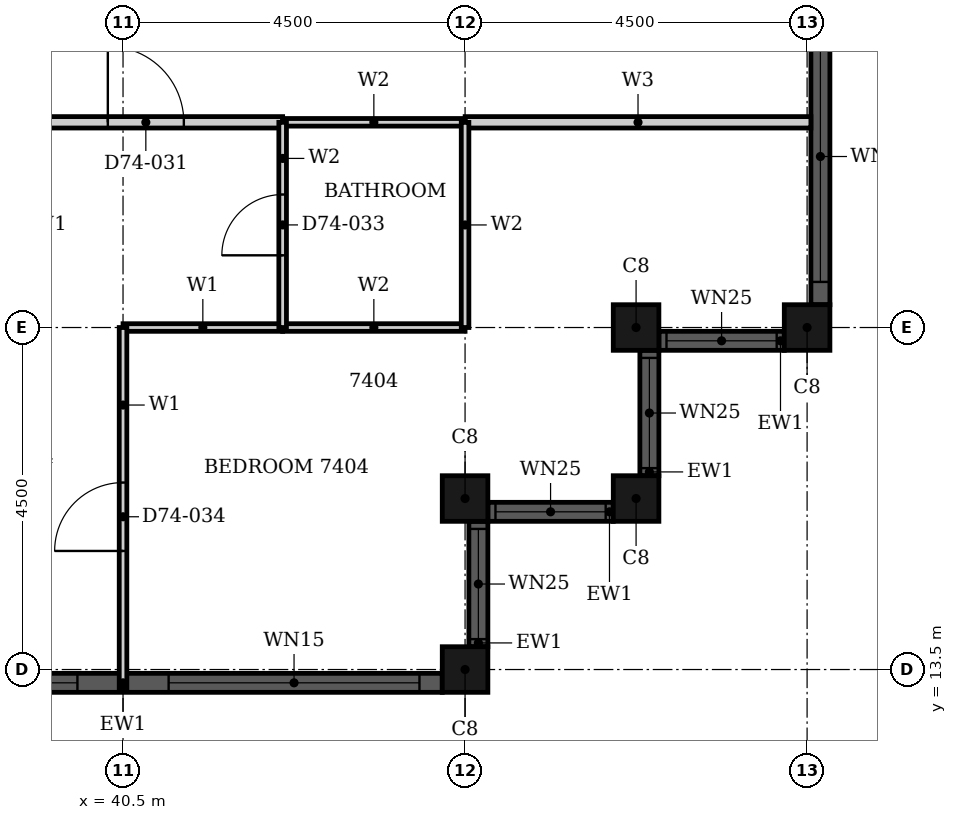
"""IFC4 building model, lengths in metres.
Left out: names, types, materials, properties, quantities, classifications, styles, units other than length and angle.
Written with IfcOpenShell. Run it as: python <this file> out.ifc"""

import sys

from ifc_helpers import new_model, si_unit, direction, frame, frame_2d, origin, origin_2d, place, context, subcontext, project, spatial, rectangle, hollow_rectangle, extrude, element, fill, save


model = new_model("IFC4")
c1 = context("Model", 3, precision=1e-05, world=origin(), true_north=direction((0.0, 1.0)))
c2 = subcontext(c1, "Body", "Model", "MODEL_VIEW")
j1 = project(units=[si_unit("LENGTHUNIT", "METRE"), si_unit("PLANEANGLEUNIT", "RADIAN")], contexts=[c1])
p1 = place(None, origin())
s1 = spatial("IfcSite", under=j1, at=p1, CompositionType="ELEMENT")
p2 = place(p1, origin())
s2 = spatial("IfcBuilding", under=s1, at=p2, CompositionType="ELEMENT")
p3 = place(p2, frame((0.0, 0.0, 290.8)))
s3 = spatial("IfcBuildingStorey", under=s2, at=p3, CompositionType="ELEMENT", Elevation=290.8)
for number, where, z_axis, x_axis in (
    (1, (45.0, 13.5, 0.0), (0.0, 0.0, 1.0), (1.0, 0.0, 0.0)),
    (2, (45.0, 15.75, 0.0), (0.0, 0.0, 1.0), (1.0, 0.0, 0.0)),
    (3, (47.25, 15.75, 0.0), (0.0, 0.0, 1.0), (1.0, 0.0, 0.0)),
    (4, (47.25, 18.0, 0.0), (0.0, 0.0, 1.0), (1.0, 0.0, 0.0)),
    (5, (49.5, 18.0, 0.0), (0.0, 0.0, 1.0), (1.0, 0.0, 0.0)),
):
    element("IfcColumn", number, at=place(p3, frame(where, z_axis=z_axis, x_axis=x_axis)), inside=s3, PredefinedType="COLUMN", context=c2, shape_type="SweptSolid", body=[
        extrude(hollow_rectangle(XDim=0.6, YDim=0.6, WallThickness=0.02, at=origin_2d()), origin(), (0.0, 0.0, 1.0), 3.7),
    ])
p4 = place(p3, frame((45.175, 13.8, 0.0), z_axis=(0.0, 0.0, 1.0), x_axis=(0.0, 1.0, 0.0)))
e6 = element("IfcWall", 6, at=p4, inside=s3, PredefinedType="SOLIDWALL", context=c2, shape_type="SweptSolid", body=[
    extrude(rectangle(XDim=1.65, YDim=0.25, at=frame_2d((0.825, 0.0))), origin(), (0.0, 0.0, 1.0), 3.7),
])
p5 = place(p4, frame((0.1, 0.0, 0.9)))
e7 = element("IfcOpeningElement", 7, at=p5, cuts=e6, PredefinedType="OPENING", context=c2, shape_type="SweptSolid", body=[
    extrude(rectangle(XDim=1.45, YDim=1.85, at=frame_2d((0.725, 0.925))), frame((0.0, 0.135, 0.0), z_axis=(0.0, -1.0, 0.0), x_axis=(1.0, 0.0, 0.0)), (0.0, 0.0, 1.0), 0.27),
])
p6 = place(p3, frame((45.3, 15.575, 0.0), z_axis=(0.0, 0.0, 1.0), x_axis=(1.0, 0.0, 0.0)))
e8 = element("IfcWall", 8, at=p6, inside=s3, PredefinedType="SOLIDWALL", context=c2, shape_type="SweptSolid", body=[
    extrude(rectangle(XDim=1.65, YDim=0.25, at=frame_2d((0.825, 0.0))), origin(), (0.0, 0.0, 1.0), 3.7),
])
p7 = place(p6, frame((0.1, 0.0, 0.9)))
e9 = element("IfcOpeningElement", 9, at=p7, cuts=e8, PredefinedType="OPENING", context=c2, shape_type="SweptSolid", body=[
    extrude(rectangle(XDim=1.45, YDim=1.85, at=frame_2d((0.725, 0.925))), frame((0.0, 0.135, 0.0), z_axis=(0.0, -1.0, 0.0), x_axis=(1.0, 0.0, 0.0)), (0.0, 0.0, 1.0), 0.27),
])
p8 = place(p3, frame((47.425, 16.05, 0.0), z_axis=(0.0, 0.0, 1.0), x_axis=(0.0, 1.0, 0.0)))
e10 = element("IfcWall", 10, at=p8, inside=s3, PredefinedType="SOLIDWALL", context=c2, shape_type="SweptSolid", body=[
    extrude(rectangle(XDim=1.65, YDim=0.25, at=frame_2d((0.825, 0.0))), origin(), (0.0, 0.0, 1.0), 3.7),
])
p9 = place(p8, frame((0.1, 0.0, 0.9)))
e11 = element("IfcOpeningElement", 11, at=p9, cuts=e10, PredefinedType="OPENING", context=c2, shape_type="SweptSolid", body=[
    extrude(rectangle(XDim=1.45, YDim=1.85, at=frame_2d((0.725, 0.925))), frame((0.0, 0.135, 0.0), z_axis=(0.0, -1.0, 0.0), x_axis=(1.0, 0.0, 0.0)), (0.0, 0.0, 1.0), 0.27),
])
p10 = place(p3, frame((47.55, 17.825, 0.0), z_axis=(0.0, 0.0, 1.0), x_axis=(1.0, 0.0, 0.0)))
e12 = element("IfcWall", 12, at=p10, inside=s3, PredefinedType="SOLIDWALL", context=c2, shape_type="SweptSolid", body=[
    extrude(rectangle(XDim=1.65, YDim=0.25, at=frame_2d((0.825, 0.0))), origin(), (0.0, 0.0, 1.0), 3.7),
])
p11 = place(p10, frame((0.1, 0.0, 0.9)))
e13 = element("IfcOpeningElement", 13, at=p11, cuts=e12, PredefinedType="OPENING", context=c2, shape_type="SweptSolid", body=[
    extrude(rectangle(XDim=1.45, YDim=1.85, at=frame_2d((0.725, 0.925))), frame((0.0, 0.135, 0.0), z_axis=(0.0, -1.0, 0.0), x_axis=(1.0, 0.0, 0.0)), (0.0, 0.0, 1.0), 0.27),
])
p12 = place(p3, frame((49.675, 18.3, 0.0), z_axis=(0.0, 0.0, 1.0), x_axis=(0.0, 1.0, 0.0)))
e14 = element("IfcWall", 14, at=p12, inside=s3, PredefinedType="SOLIDWALL", context=c2, shape_type="SweptSolid", body=[
    extrude(rectangle(XDim=8.4, YDim=0.25, at=frame_2d((4.2, 0.0))), origin(), (0.0, 0.0, 1.0), 3.7),
])
p13 = place(p12, frame((0.3, 0.0, 0.45)))
e15 = element("IfcOpeningElement", 15, at=p13, cuts=e14, PredefinedType="OPENING", context=c2, shape_type="SweptSolid", body=[
    extrude(rectangle(XDim=3.3, YDim=2.3, at=frame_2d((1.65, 1.15))), frame((0.0, 0.135, 0.0), z_axis=(0.0, -1.0, 0.0), x_axis=(1.0, 0.0, 0.0)), (0.0, 0.0, 1.0), 0.27),
])
p14 = place(p12, frame((4.8, 0.0, 0.45)))
e16 = element("IfcOpeningElement", 16, at=p14, cuts=e14, PredefinedType="OPENING", context=c2, shape_type="SweptSolid", body=[
    extrude(rectangle(XDim=3.3, YDim=2.3, at=frame_2d((1.65, 1.15))), frame((0.0, 0.135, 0.0), z_axis=(0.0, -1.0, 0.0), x_axis=(1.0, 0.0, 0.0)), (0.0, 0.0, 1.0), 0.27),
])
p15 = place(p3, frame((36.3, 13.325, 0.0), z_axis=(0.0, 0.0, 1.0), x_axis=(1.0, 0.0, 0.0)))
e17 = element("IfcWall", 17, at=p15, inside=s3, PredefinedType="SOLIDWALL", context=c2, shape_type="SweptSolid", body=[
    extrude(rectangle(XDim=8.4, YDim=0.25, at=frame_2d((4.2, 0.0))), origin(), (0.0, 0.0, 1.0), 3.7),
])
p16 = place(p15, frame((0.3, 0.0, 0.45)))
e18 = element("IfcOpeningElement", 18, at=p16, cuts=e17, PredefinedType="OPENING", context=c2, shape_type="SweptSolid", body=[
    extrude(rectangle(XDim=3.3, YDim=2.3, at=frame_2d((1.65, 1.15))), frame((0.0, 0.135, 0.0), z_axis=(0.0, -1.0, 0.0), x_axis=(1.0, 0.0, 0.0)), (0.0, 0.0, 1.0), 0.27),
])
p17 = place(p15, frame((4.8, 0.0, 0.45)))
e19 = element("IfcOpeningElement", 19, at=p17, cuts=e17, PredefinedType="OPENING", context=c2, shape_type="SweptSolid", body=[
    extrude(rectangle(XDim=3.3, YDim=2.3, at=frame_2d((1.65, 1.15))), frame((0.0, 0.135, 0.0), z_axis=(0.0, -1.0, 0.0), x_axis=(1.0, 0.0, 0.0)), (0.0, 0.0, 1.0), 0.27),
])
p18 = place(p3, frame((45.001, 20.7, 0.0), z_axis=(0.0, 0.0, 1.0), x_axis=(1.0, 0.0, 0.0)))
e20 = element("IfcWall", 20, at=p18, inside=s3, PredefinedType="PARTITIONING", context=c2, shape_type="SweptSolid", body=[
    extrude(rectangle(XDim=4.549, YDim=0.15, at=frame_2d((2.274, 0.0))), origin(), (0.0, 0.0, 1.0), 3.4),
])
p19 = place(p3, frame((36.0, 20.7, 0.0), z_axis=(0.0, 0.0, 1.0), x_axis=(1.0, 0.0, 0.0)))
e21 = element("IfcWall", 21, at=p19, inside=s3, PredefinedType="PARTITIONING", context=c2, shape_type="SweptSolid", body=[
    extrude(rectangle(XDim=6.6, YDim=0.15, at=frame_2d((3.3, 0.0))), origin(), (0.0, 0.0, 1.0), 3.4),
])
p20 = place(p19, frame((4.3, 0.0, 0.0)))
e22 = element("IfcOpeningElement", 22, at=p20, cuts=e21, PredefinedType="OPENING", context=c2, shape_type="SweptSolid", body=[
    extrude(rectangle(XDim=1.0, YDim=2.2, at=frame_2d((0.5, 1.1))), frame((0.0, 0.085, 0.0), z_axis=(0.0, -1.0, 0.0), x_axis=(1.0, 0.0, 0.0)), (0.0, 0.0, 1.0), 0.17),
])
p21 = place(p3, frame((40.5, 18.0, 0.0), z_axis=(0.0, 0.0, 1.0), x_axis=(1.0, 0.0, 0.0)))
e23 = element("IfcWall", 23, at=p21, inside=s3, PredefinedType="PARTITIONING", context=c2, shape_type="SweptSolid", body=[
    extrude(rectangle(XDim=2.1, YDim=0.1, at=frame_2d((1.05, 0.0))), origin(), (0.0, 0.0, 1.0), 3.4),
])
p22 = place(p3, frame((40.5, 13.26, 0.0), z_axis=(0.0, 0.0, 1.0), x_axis=(0.0, 1.0, 0.0)))
e24 = element("IfcWall", 24, at=p22, inside=s3, PredefinedType="PARTITIONING", context=c2, shape_type="SweptSolid", body=[
    extrude(rectangle(XDim=4.74, YDim=0.1, at=frame_2d((2.37, 0.0))), origin(), (0.0, 0.0, 1.0), 3.4),
])
p23 = place(p22, frame((1.8, 0.0, 0.0)))
e25 = element("IfcOpeningElement", 25, at=p23, cuts=e24, PredefinedType="OPENING", context=c2, shape_type="SweptSolid", body=[
    extrude(rectangle(XDim=0.9, YDim=2.1, at=frame_2d((0.45, 1.05))), frame((0.0, 0.06, 0.0), z_axis=(0.0, -1.0, 0.0), x_axis=(1.0, 0.0, 0.0)), (0.0, 0.0, 1.0), 0.12),
])
for number, where, z_axis, x_axis in (
    (26, (42.6, 18.0, 0.0), (0.0, 0.0, 1.0), (1.0, 0.0, 0.0)),
    (27, (42.6, 20.7, 0.0), (0.0, 0.0, 1.0), (1.0, 0.0, 0.0)),
):
    element("IfcWall", number, at=place(p3, frame(where, z_axis=z_axis, x_axis=x_axis)), inside=s3, PredefinedType="PARTITIONING", context=c2, shape_type="SweptSolid", body=[
        extrude(rectangle(XDim=2.4, YDim=0.1, at=frame_2d((1.2, 0.0))), origin(), (0.0, 0.0, 1.0), 3.4),
    ])
p24 = place(p3, frame((42.6, 18.0, 0.0), z_axis=(0.0, 0.0, 1.0), x_axis=(0.0, 1.0, 0.0)))
e28 = element("IfcWall", 28, at=p24, inside=s3, PredefinedType="PARTITIONING", context=c2, shape_type="SweptSolid", body=[
    extrude(rectangle(XDim=2.7, YDim=0.1, at=frame_2d((1.35, 0.0))), origin(), (0.0, 0.0, 1.0), 3.4),
])
p25 = place(p24, frame((0.95, 0.0, 0.0)))
e29 = element("IfcOpeningElement", 29, at=p25, cuts=e28, PredefinedType="OPENING", context=c2, shape_type="SweptSolid", body=[
    extrude(rectangle(XDim=0.8, YDim=2.1, at=frame_2d((0.4, 1.05))), frame((0.0, 0.06, 0.0), z_axis=(0.0, -1.0, 0.0), x_axis=(1.0, 0.0, 0.0)), (0.0, 0.0, 1.0), 0.12),
])
p26 = place(p3, frame((45.0, 18.0, 0.0), z_axis=(0.0, 0.0, 1.0), x_axis=(0.0, 1.0, 0.0)))
e30 = element("IfcWall", 30, at=p26, inside=s3, PredefinedType="PARTITIONING", context=c2, shape_type="SweptSolid", body=[
    extrude(rectangle(XDim=2.699, YDim=0.1, at=frame_2d((1.35, 0.0))), origin(), (0.0, 0.0, 1.0), 3.4),
])
p27 = place(p5, origin())
e31 = element("IfcWindow", 31, at=p27, inside=s3, PartitioningType="SINGLE_PANEL", PredefinedType="WINDOW", context=c2, shape_type="SweptSolid", body=[
    extrude(rectangle(XDim=1.45, YDim=1.85, at=frame_2d((0.725, 0.925))), frame((0.0, 0.03, 0.0), z_axis=(0.0, -1.0, 0.0), x_axis=(1.0, 0.0, 0.0)), (0.0, 0.0, 1.0), 0.06),
])
fill(e7, e31)
p28 = place(p7, origin())
e32 = element("IfcWindow", 32, at=p28, inside=s3, PartitioningType="SINGLE_PANEL", PredefinedType="WINDOW", context=c2, shape_type="SweptSolid", body=[
    extrude(rectangle(XDim=1.45, YDim=1.85, at=frame_2d((0.725, 0.925))), frame((0.0, 0.03, 0.0), z_axis=(0.0, -1.0, 0.0), x_axis=(1.0, 0.0, 0.0)), (0.0, 0.0, 1.0), 0.06),
])
fill(e9, e32)
p29 = place(p9, origin())
e33 = element("IfcWindow", 33, at=p29, inside=s3, PartitioningType="SINGLE_PANEL", PredefinedType="WINDOW", context=c2, shape_type="SweptSolid", body=[
    extrude(rectangle(XDim=1.45, YDim=1.85, at=frame_2d((0.725, 0.925))), frame((0.0, 0.03, 0.0), z_axis=(0.0, -1.0, 0.0), x_axis=(1.0, 0.0, 0.0)), (0.0, 0.0, 1.0), 0.06),
])
fill(e11, e33)
p30 = place(p11, origin())
e34 = element("IfcWindow", 34, at=p30, inside=s3, PartitioningType="SINGLE_PANEL", PredefinedType="WINDOW", context=c2, shape_type="SweptSolid", body=[
    extrude(rectangle(XDim=1.45, YDim=1.85, at=frame_2d((0.725, 0.925))), frame((0.0, 0.03, 0.0), z_axis=(0.0, -1.0, 0.0), x_axis=(1.0, 0.0, 0.0)), (0.0, 0.0, 1.0), 0.06),
])
fill(e13, e34)
p31 = place(p13, origin())
e35 = element("IfcWindow", 35, at=p31, inside=s3, PartitioningType="SINGLE_PANEL", PredefinedType="WINDOW", context=c2, shape_type="SweptSolid", body=[
    extrude(rectangle(XDim=3.3, YDim=2.3, at=frame_2d((1.65, 1.15))), frame((0.0, 0.03, 0.0), z_axis=(0.0, -1.0, 0.0), x_axis=(1.0, 0.0, 0.0)), (0.0, 0.0, 1.0), 0.06),
])
fill(e15, e35)
p32 = place(p16, origin())
e36 = element("IfcWindow", 36, at=p32, inside=s3, PartitioningType="SINGLE_PANEL", PredefinedType="WINDOW", context=c2, shape_type="SweptSolid", body=[
    extrude(rectangle(XDim=3.3, YDim=2.3, at=frame_2d((1.65, 1.15))), frame((0.0, 0.03, 0.0), z_axis=(0.0, -1.0, 0.0), x_axis=(1.0, 0.0, 0.0)), (0.0, 0.0, 1.0), 0.06),
])
fill(e18, e36)
p33 = place(p17, origin())
e37 = element("IfcWindow", 37, at=p33, inside=s3, PartitioningType="SINGLE_PANEL", PredefinedType="WINDOW", context=c2, shape_type="SweptSolid", body=[
    extrude(rectangle(XDim=3.3, YDim=2.3, at=frame_2d((1.65, 1.15))), frame((0.0, 0.03, 0.0), z_axis=(0.0, -1.0, 0.0), x_axis=(1.0, 0.0, 0.0)), (0.0, 0.0, 1.0), 0.06),
])
fill(e19, e37)
p34 = place(p20, origin())
e38 = element("IfcDoor", 38, at=p34, inside=s3, OperationType="SINGLE_SWING_RIGHT", PredefinedType="DOOR", context=c2, shape_type="SweptSolid", body=[
    extrude(rectangle(XDim=1.0, YDim=2.2, at=frame_2d((0.5, 1.1))), frame((0.0, 0.025, 0.0), z_axis=(0.0, -1.0, 0.0), x_axis=(1.0, 0.0, 0.0)), (0.0, 0.0, 1.0), 0.05),
])
fill(e22, e38)
p35 = place(p25, origin())
e39 = element("IfcDoor", 39, at=p35, inside=s3, OperationType="SINGLE_SWING_RIGHT", PredefinedType="DOOR", context=c2, shape_type="SweptSolid", body=[
    extrude(rectangle(XDim=0.8, YDim=2.1, at=frame_2d((0.4, 1.05))), frame((0.0, 0.025, 0.0), z_axis=(0.0, -1.0, 0.0), x_axis=(1.0, 0.0, 0.0)), (0.0, 0.0, 1.0), 0.05),
])
fill(e29, e39)
p36 = place(p23, origin())
e40 = element("IfcDoor", 40, at=p36, inside=s3, OperationType="SINGLE_SWING_LEFT", PredefinedType="DOOR", context=c2, shape_type="SweptSolid", body=[
    extrude(rectangle(XDim=0.9, YDim=2.1, at=frame_2d((0.45, 1.05))), frame((0.0, 0.025, 0.0), z_axis=(0.0, -1.0, 0.0), x_axis=(1.0, 0.0, 0.0)), (0.0, 0.0, 1.0), 0.05),
])
fill(e25, e40)
save(model, sys.argv[1])
